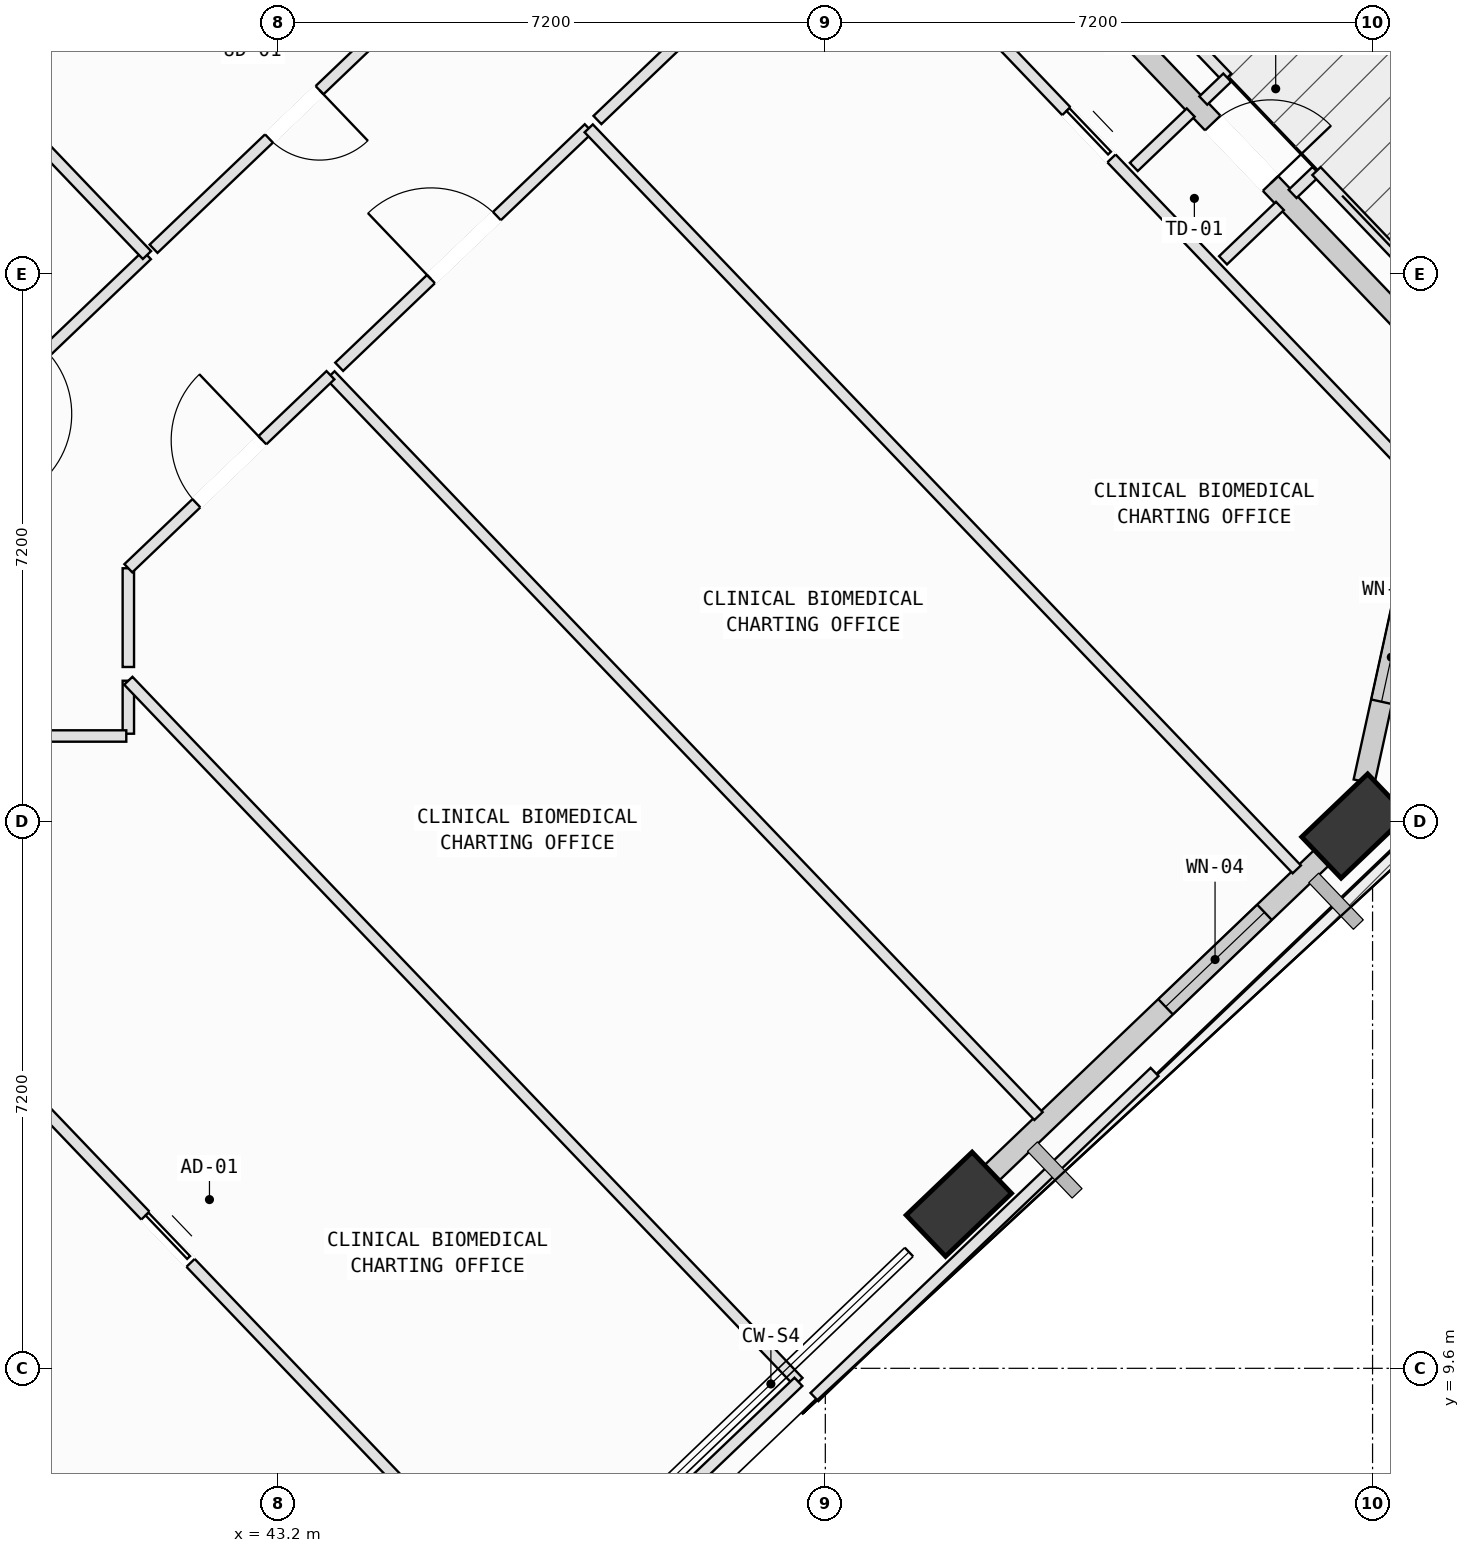
"""IFC4 building model, lengths in metres.
Left out: names, types, materials, properties, quantities, classifications, styles, units other than length and angle.
Written with IfcOpenShell. Run it as: python <this file> out.ifc"""

import sys

from ifc_helpers import new_model, si_unit, direction, frame, frame_2d, origin, origin_2d, place, context, subcontext, project, spatial, rectangle, extrude, element, fill, save


model = new_model("IFC4")
c1 = context("Model", 3, precision=1e-05, world=origin(), true_north=direction((0.0, 1.0)))
c2 = subcontext(c1, "Body", "Model", "MODEL_VIEW")
j1 = project(units=[si_unit("LENGTHUNIT", "METRE"), si_unit("PLANEANGLEUNIT", "RADIAN")], contexts=[c1])
p1 = place(None, origin())
s1 = spatial("IfcSite", under=j1, at=p1, CompositionType="ELEMENT")
p2 = place(p1, origin())
s2 = spatial("IfcBuilding", under=s1, at=p2, CompositionType="ELEMENT")
p3 = place(p2, frame((0.0, 0.0, 211.2)))
s3 = spatial("IfcBuildingStorey", under=s2, at=p3, CompositionType="ELEMENT", Elevation=211.2)
p4 = place(p3, frame((52.157, 11.759, 0.067), z_axis=(0.05323008736, 0.077032158944, 0.995606651388), x_axis=(-0.98581194201, -0.154886974175, 0.064690341027)))
e1 = element("IfcColumn", 1, at=p4, inside=s3, PredefinedType="COLUMN", context=c2, shape_type="SweptSolid", body=[
    extrude(rectangle(XDim=1.2, YDim=0.75, at=origin_2d()), origin(), (0.0, 0.0, 1.0), 3.949),
])
p5 = place(p3, frame((57.361, 16.735, 0.073), z_axis=(0.032482055305, 0.098250483475, 0.994631468726), x_axis=(-0.902127024393, -0.425506275001, 0.071492949273)))
e2 = element("IfcColumn", 2, at=p5, inside=s3, PredefinedType="COLUMN", context=c2, shape_type="SweptSolid", body=[
    extrude(rectangle(XDim=1.2, YDim=0.75, at=origin_2d()), origin(), (0.0, 0.0, 1.0), 3.946),
])
p6 = place(p3, frame((57.213, 16.589, 0.0), z_axis=(0.0, 0.0, 1.0), x_axis=(-0.722958179975, -0.69089179327, 0.0)))
e3 = element("IfcWall", 3, at=p6, inside=s3, PredefinedType="SOLIDWALL", context=c2, shape_type="SweptSolid", body=[
    extrude(rectangle(XDim=6.418, YDim=0.28, at=frame_2d((3.209, 0.0))), origin(), (0.0, 0.0, 1.0), 3.265),
])
p7 = place(p6, frame((1.431, 0.0, 0.75)))
e4 = element("IfcOpeningElement", 4, at=p7, cuts=e3, PredefinedType="OPENING", context=c2, shape_type="SweptSolid", body=[
    extrude(rectangle(XDim=1.8, YDim=2.05, at=frame_2d((0.9, 1.025))), frame((0.0, 0.15, 0.0), z_axis=(0.0, -1.0, 0.0), x_axis=(1.0, 0.0, 0.0)), (0.0, 0.0, 1.0), 0.3),
])
p8 = place(p3, frame((58.62, 22.49, 0.0), z_axis=(0.0, 0.0, 1.0), x_axis=(-0.213848166645, -0.976866910906, 0.0)))
e5 = element("IfcWall", 5, at=p8, inside=s3, PredefinedType="SOLIDWALL", context=c2, shape_type="SweptSolid", body=[
    extrude(rectangle(XDim=5.294, YDim=0.28, at=frame_2d((2.647, 0.0))), origin(), (0.0, 0.0, 1.0), 3.265),
])
p9 = place(p8, frame((3.017, 0.0, 0.75)))
e6 = element("IfcOpeningElement", 6, at=p9, cuts=e5, PredefinedType="OPENING", context=c2, shape_type="SweptSolid", body=[
    extrude(rectangle(XDim=1.2, YDim=1.75, at=frame_2d((0.6, 0.875))), frame((0.0, 0.15, 0.0), z_axis=(0.0, -1.0, 0.0), x_axis=(1.0, 0.0, 0.0)), (0.0, 0.0, 1.0), 0.3),
])
p10 = place(p3, frame((53.443, 28.135, 0.0), z_axis=(0.0, 0.0, 1.0), x_axis=(0.690865418221, -0.722983384253, 0.0)))
e7 = element("IfcWall", 7, at=p10, inside=s3, PredefinedType="SOLIDWALL", context=c2, shape_type="SweptSolid", body=[
    extrude(rectangle(XDim=7.046, YDim=0.28, at=frame_2d((3.523, 0.0))), origin(), (0.0, 0.0, 1.0), 3.265),
])
p11 = place(p10, frame((2.973, 0.0, 0.0)))
e8 = element("IfcOpeningElement", 8, at=p11, cuts=e7, PredefinedType="OPENING", context=c2, shape_type="SweptSolid", body=[
    extrude(rectangle(XDim=1.1, YDim=2.15, at=frame_2d((0.55, 1.075))), frame((0.0, 0.15, 0.0), z_axis=(0.0, -1.0, 0.0), x_axis=(1.0, 0.0, 0.0)), (0.0, 0.0, 1.0), 0.3),
])
p12 = place(p3, frame((36.15, 10.357, 0.0), z_axis=(0.0, 0.0, 1.0), x_axis=(0.690871478305, -0.722977593335, 0.0)))
e9 = element("IfcWall", 9, at=p12, inside=s3, PredefinedType="PARTITIONING", context=c2, shape_type="SweptSolid", body=[
    extrude(rectangle(XDim=9.931, YDim=0.15, at=frame_2d((4.966, 0.0))), origin(), (0.0, 0.0, 1.0), 3.78),
])
p13 = place(p12, frame((4.535, 0.0, 0.0)))
e10 = element("IfcOpeningElement", 10, at=p13, cuts=e9, PredefinedType="OPENING", context=c2, shape_type="SweptSolid", body=[
    extrude(rectangle(XDim=0.86, YDim=2.06, at=frame_2d((0.43, 1.03))), frame((0.0, 0.085, 0.0), z_axis=(0.0, -1.0, 0.0), x_axis=(1.0, 0.0, 0.0)), (0.0, 0.0, 1.0), 0.17),
])
p14 = place(p3, frame((37.093, 16.173, 0.0), z_axis=(0.0, 0.0, 1.0), x_axis=(0.690902774349, -0.722947685795, 0.0)))
e11 = element("IfcWall", 11, at=p14, inside=s3, PredefinedType="PARTITIONING", context=c2, shape_type="SweptSolid", body=[
    extrude(rectangle(XDim=13.485, YDim=0.15, at=frame_2d((6.743, 0.0))), origin(), (0.0, 0.0, 1.0), 3.78),
])
p15 = place(p14, frame((6.312, 0.0, 0.0)))
e12 = element("IfcOpeningElement", 12, at=p15, cuts=e11, PredefinedType="OPENING", context=c2, shape_type="SweptSolid", body=[
    extrude(rectangle(XDim=0.86, YDim=2.06, at=frame_2d((0.43, 1.03))), frame((0.0, 0.085, 0.0), z_axis=(0.0, -1.0, 0.0), x_axis=(1.0, 0.0, 0.0)), (0.0, 0.0, 1.0), 0.17),
])
p16 = place(p3, frame((41.23, 17.95, 0.0), z_axis=(0.0, 0.0, 1.0), x_axis=(0.0, 1.0, 0.0)))
e13 = element("IfcWall", 13, at=p16, inside=s3, PredefinedType="PARTITIONING", context=c2, shape_type="SweptSolid", body=[
    extrude(rectangle(XDim=0.697, YDim=0.15, at=frame_2d((0.349, 0.0))), origin(), (0.0, 0.0, 1.0), 3.78),
])
p17 = place(p3, frame((41.23, 18.647, 0.0), z_axis=(0.0, 0.0, 1.0), x_axis=(0.690901109008, -0.722949277316, 0.0)))
e14 = element("IfcWall", 14, at=p17, inside=s3, PredefinedType="PARTITIONING", context=c2, shape_type="SweptSolid", body=[
    extrude(rectangle(XDim=12.76, YDim=0.15, at=frame_2d((6.38, 0.0))), origin(), (0.0, 0.0, 1.0), 3.78),
])
p18 = place(p3, frame((50.046, 9.422, 0.0), z_axis=(0.0, 0.0, 1.0), x_axis=(-0.723045801537, -0.690800093283, 0.0)))
e15 = element("IfcWall", 15, at=p18, inside=s3, PredefinedType="PARTITIONING", context=c2, shape_type="SweptSolid", body=[
    extrude(rectangle(XDim=4.278, YDim=0.15, at=frame_2d((2.139, 0.0))), origin(), (0.0, 0.0, 1.0), 3.265),
])
p19 = place(p3, frame((38.921, 17.92, 0.0), z_axis=(0.0, 0.0, 1.0), x_axis=(1.0, 0.0, 0.0)))
e16 = element("IfcWall", 16, at=p19, inside=s3, PredefinedType="PARTITIONING", context=c2, shape_type="SweptSolid", body=[
    extrude(rectangle(XDim=2.282, YDim=0.15, at=frame_2d((1.141, 0.0))), origin(), (0.0, 0.0, 1.0), 3.78),
])
p20 = place(p3, frame((43.889, 22.667, 0.0), z_axis=(0.0, 0.0, 1.0), x_axis=(0.690910559681, -0.722940245471, 0.0)))
e17 = element("IfcWall", 17, at=p20, inside=s3, PredefinedType="PARTITIONING", context=c2, shape_type="SweptSolid", body=[
    extrude(rectangle(XDim=13.484, YDim=0.15, at=frame_2d((6.742, 0.0))), origin(), (0.0, 0.0, 1.0), 3.415),
])
p21 = place(p3, frame((41.23, 18.828, 0.0), z_axis=(0.0, 0.0, 1.0), x_axis=(0.0, 1.0, 0.0)))
e18 = element("IfcWall", 18, at=p21, inside=s3, PredefinedType="PARTITIONING", context=c2, shape_type="SweptSolid", body=[
    extrude(rectangle(XDim=1.299, YDim=0.15, at=frame_2d((0.649, 0.0))), origin(), (0.0, 0.0, 1.0), 3.78),
])
p22 = place(p3, frame((41.23, 20.127, 0.0), z_axis=(0.0, 0.0, 1.0), x_axis=(0.723088697015, 0.690755192705, 0.0)))
e19 = element("IfcWall", 19, at=p22, inside=s3, PredefinedType="PARTITIONING", context=c2, shape_type="SweptSolid", body=[
    extrude(rectangle(XDim=3.677, YDim=0.15, at=frame_2d((1.839, 0.0))), origin(), (0.0, 0.0, 1.0), 2.765),
])
p23 = place(p22, frame((1.239, 0.0, 0.0)))
e20 = element("IfcOpeningElement", 20, at=p23, cuts=e19, PredefinedType="OPENING", context=c2, shape_type="SweptSolid", body=[
    extrude(rectangle(XDim=1.2, YDim=2.15, at=frame_2d((0.6, 1.075))), frame((0.0, 0.085, 0.0), z_axis=(0.0, -1.0, 0.0), x_axis=(1.0, 0.0, 0.0)), (0.0, 0.0, 1.0), 0.17),
])
p24 = place(p3, frame((44.004, 22.778, 0.0), z_axis=(0.0, 0.0, 1.0), x_axis=(0.723025899483, 0.69082092374, 0.0)))
e21 = element("IfcWall", 21, at=p24, inside=s3, PredefinedType="PARTITIONING", context=c2, shape_type="SweptSolid", body=[
    extrude(rectangle(XDim=4.541, YDim=0.15, at=frame_2d((2.271, 0.0))), origin(), (0.0, 0.0, 1.0), 2.765),
])
p25 = place(p24, frame((1.67, 0.0, 0.0)))
e22 = element("IfcOpeningElement", 22, at=p25, cuts=e21, PredefinedType="OPENING", context=c2, shape_type="SweptSolid", body=[
    extrude(rectangle(XDim=1.2, YDim=2.15, at=frame_2d((0.6, 1.075))), frame((0.0, 0.085, 0.0), z_axis=(0.0, -1.0, 0.0), x_axis=(1.0, 0.0, 0.0)), (0.0, 0.0, 1.0), 0.17),
])
p26 = place(p3, frame((47.287, 25.915, 0.0), z_axis=(0.0, 0.0, 1.0), x_axis=(0.690828749695, -0.72301842203, 0.0)))
e23 = element("IfcWall", 23, at=p26, inside=s3, PredefinedType="PARTITIONING", context=c2, shape_type="SweptSolid", body=[
    extrude(rectangle(XDim=13.485, YDim=0.15, at=frame_2d((6.743, 0.0))), origin(), (0.0, 0.0, 1.0), 3.78),
])
p27 = place(p3, frame((59.397, 18.358, 0.0), z_axis=(0.0, 0.0, 1.0), x_axis=(-0.723173492575, -0.690666417047, 0.0)))
e24 = element("IfcWall", 24, at=p27, inside=s3, PredefinedType="PARTITIONING", context=c2, shape_type="SweptSolid", body=[
    extrude(rectangle(XDim=2.801, YDim=0.15, at=frame_2d((1.401, 0.0))), origin(), (0.0, 0.0, 1.0), 3.265),
])
p28 = place(p3, frame((47.402, 26.025, 0.0), z_axis=(0.0, 0.0, 1.0), x_axis=(0.722973384646, 0.690875882553, 0.0)))
e25 = element("IfcWall", 25, at=p28, inside=s3, PredefinedType="PARTITIONING", context=c2, shape_type="SweptSolid", body=[
    extrude(rectangle(XDim=4.541, YDim=0.15, at=frame_2d((2.271, 0.0))), origin(), (0.0, 0.0, 1.0), 3.78),
])
p29 = place(p28, frame((1.67, 0.0, 0.0)))
e26 = element("IfcOpeningElement", 26, at=p29, cuts=e25, PredefinedType="OPENING", context=c2, shape_type="SweptSolid", body=[
    extrude(rectangle(XDim=1.2, YDim=2.15, at=frame_2d((0.6, 1.075))), frame((0.0, 0.085, 0.0), z_axis=(0.0, -1.0, 0.0), x_axis=(1.0, 0.0, 0.0)), (0.0, 0.0, 1.0), 0.17),
])
p30 = place(p3, frame((50.685, 29.162, 0.0), z_axis=(0.0, 0.0, 1.0), x_axis=(0.690801446866, -0.723044508317, 0.0)))
e27 = element("IfcWall", 27, at=p30, inside=s3, PredefinedType="PARTITIONING", context=c2, shape_type="SweptSolid", body=[
    extrude(rectangle(XDim=10.926, YDim=0.15, at=frame_2d((5.463, 0.0))), origin(), (0.0, 0.0, 1.0), 3.78),
])
p31 = place(p30, frame((4.177, 0.0, 0.0)))
e28 = element("IfcOpeningElement", 28, at=p31, cuts=e27, PredefinedType="OPENING", context=c2, shape_type="SweptSolid", body=[
    extrude(rectangle(XDim=0.86, YDim=2.06, at=frame_2d((0.43, 1.03))), frame((0.0, 0.085, 0.0), z_axis=(0.0, -1.0, 0.0), x_axis=(1.0, 0.0, 0.0)), (0.0, 0.0, 1.0), 0.17),
])
p32 = place(p3, frame((41.475, 24.248, 0.0), z_axis=(0.0, 0.0, 1.0), x_axis=(-0.723006310532, -0.690841425315, 0.0)))
e29 = element("IfcWall", 29, at=p32, inside=s3, PredefinedType="PARTITIONING", context=c2, shape_type="SweptSolid", body=[
    extrude(rectangle(XDim=4.858, YDim=0.15, at=frame_2d((2.429, 0.0))), origin(), (0.0, 0.0, 1.0), 2.765),
])
p33 = place(p32, frame((1.829, 0.0, 0.0)))
e30 = element("IfcOpeningElement", 30, at=p33, cuts=e29, PredefinedType="OPENING", context=c2, shape_type="SweptSolid", body=[
    extrude(rectangle(XDim=1.2, YDim=2.15, at=frame_2d((0.6, 1.075))), frame((0.0, 0.085, 0.0), z_axis=(0.0, -1.0, 0.0), x_axis=(1.0, 0.0, 0.0)), (0.0, 0.0, 1.0), 0.17),
])
p34 = place(p3, frame((38.453, 27.411, 0.0), z_axis=(0.0, 0.0, 1.0), x_axis=(0.690851288879, -0.722996885647, 0.0)))
e31 = element("IfcWall", 31, at=p34, inside=s3, PredefinedType="PARTITIONING", context=c2, shape_type="SweptSolid", body=[
    extrude(rectangle(XDim=4.375, YDim=0.15, at=frame_2d((2.187, 0.0))), origin(), (0.0, 0.0, 1.0), 3.415),
])
p35 = place(p3, frame((45.264, 27.868, 0.0), z_axis=(0.0, 0.0, 1.0), x_axis=(-0.723040441691, -0.690805703276, 0.0)))
e32 = element("IfcWall", 32, at=p35, inside=s3, PredefinedType="PARTITIONING", context=c2, shape_type="SweptSolid", body=[
    extrude(rectangle(XDim=5.12, YDim=0.15, at=frame_2d((2.56, 0.0))), origin(), (0.0, 0.0, 1.0), 3.78),
])
p36 = place(p35, frame((2.1, 0.0, 0.0)))
e33 = element("IfcOpeningElement", 33, at=p36, cuts=e32, PredefinedType="OPENING", context=c2, shape_type="SweptSolid", body=[
    extrude(rectangle(XDim=0.92, YDim=2.1, at=frame_2d((0.46, 1.05))), frame((0.0, 0.085, 0.0), z_axis=(0.0, -1.0, 0.0), x_axis=(1.0, 0.0, 0.0)), (0.0, 0.0, 1.0), 0.17),
])
p37 = place(p3, frame((54.732, 13.499, 0.0), z_axis=(0.0, 0.0, 1.0), x_axis=(-0.722899628279, -0.690953057331, 0.0)))
e34 = element("IfcWall", 34, at=p37, inside=s3, PredefinedType="PARTITIONING", context=c2, shape_type="SweptSolid", body=[
    extrude(rectangle(XDim=6.19, YDim=0.15, at=frame_2d((3.095, 0.0))), origin(), (0.0, 0.0, 1.0), 3.78),
])
p38 = place(p3, frame((51.963, 30.48, 0.0), z_axis=(0.0, 0.0, 1.0), x_axis=(0.690895641029, -0.722954502862, 0.0)))
e35 = element("IfcWall", 35, at=p38, inside=s3, PredefinedType="PARTITIONING", context=c2, shape_type="SweptSolid", body=[
    extrude(rectangle(XDim=5.392, YDim=0.15, at=frame_2d((2.696, 0.0))), origin(), (0.0, 0.0, 1.0), 3.265),
])
p39 = place(p3, frame((55.688, 26.582, 0.0), z_axis=(0.0, 0.0, 1.0), x_axis=(-0.7228973834, -0.690955405994, 0.0)))
e36 = element("IfcWall", 36, at=p39, inside=s3, PredefinedType="PARTITIONING", context=c2, shape_type="SweptSolid", body=[
    extrude(rectangle(XDim=0.436, YDim=0.15, at=frame_2d((0.218, 0.0))), origin(), (0.0, 0.0, 1.0), 3.78),
])
for number, where, z_axis, x_axis in (
    (37, (55.207, 26.123, 0.0), (0.0, 0.0, 1.0), (-0.723, -0.691, 0.0)),
    (38, (55.633, 24.179, 0.0), (0.0, 0.0, 1.0), (0.723, 0.691, 0.0)),
):
    element("IfcWall", number, at=place(p3, frame(where, z_axis=z_axis, x_axis=x_axis)), inside=s3, PredefinedType="PARTITIONING", context=c2, shape_type="SweptSolid", body=[
        extrude(rectangle(XDim=1.035, YDim=0.15, at=frame_2d((0.518, 0.0))), origin(), (0.0, 0.0, 1.0), 3.78),
    ])
p40 = place(p3, frame((56.548, 25.053, 0.0), z_axis=(0.0, 0.0, 1.0), x_axis=(0.722947010739, 0.690903480714, 0.0)))
e39 = element("IfcWall", 39, at=p40, inside=s3, PredefinedType="PARTITIONING", context=c2, shape_type="SweptSolid", body=[
    extrude(rectangle(XDim=0.434, YDim=0.15, at=frame_2d((0.217, 0.0))), origin(), (0.0, 0.0, 1.0), 3.78),
])
p41 = place(p3, frame((56.862, 25.353, 0.0), z_axis=(0.0, 0.0, 1.0), x_axis=(0.690932627738, -0.722919154489, 0.0)))
e40 = element("IfcWall", 40, at=p41, inside=s3, PredefinedType="PARTITIONING", context=c2, shape_type="SweptSolid", body=[
    extrude(rectangle(XDim=4.129, YDim=0.15, at=frame_2d((2.064, 0.0))), origin(), (0.0, 0.0, 1.0), 3.265),
])
p42 = place(p11, origin())
e41 = element("IfcDoor", 41, at=p42, inside=s3, OperationType="SINGLE_SWING_RIGHT", PredefinedType="DOOR", context=c2, shape_type="SweptSolid", body=[
    extrude(rectangle(XDim=1.1, YDim=2.15, at=frame_2d((0.55, 1.075))), frame((0.0, 0.025, 0.0), z_axis=(0.0, -1.0, 0.0), x_axis=(1.0, 0.0, 0.0)), (0.0, 0.0, 1.0), 0.05),
])
fill(e8, e41)
p43 = place(p7, origin())
e42 = element("IfcWindow", 42, at=p43, inside=s3, PartitioningType="SINGLE_PANEL", PredefinedType="WINDOW", context=c2, shape_type="SweptSolid", body=[
    extrude(rectangle(XDim=1.8, YDim=2.05, at=frame_2d((0.9, 1.025))), frame((0.0, 0.03, 0.0), z_axis=(0.0, -1.0, 0.0), x_axis=(1.0, 0.0, 0.0)), (0.0, 0.0, 1.0), 0.06),
])
fill(e4, e42)
p44 = place(p9, origin())
e43 = element("IfcWindow", 43, at=p44, inside=s3, PartitioningType="SINGLE_PANEL", PredefinedType="WINDOW", context=c2, shape_type="SweptSolid", body=[
    extrude(rectangle(XDim=1.2, YDim=1.75, at=frame_2d((0.6, 0.875))), frame((0.0, 0.03, 0.0), z_axis=(0.0, -1.0, 0.0), x_axis=(1.0, 0.0, 0.0)), (0.0, 0.0, 1.0), 0.06),
])
fill(e6, e43)
p45 = place(p23, origin())
e44 = element("IfcDoor", 44, at=p45, inside=s3, OperationType="SINGLE_SWING_RIGHT", PredefinedType="DOOR", context=c2, shape_type="SweptSolid", body=[
    extrude(rectangle(XDim=1.2, YDim=2.15, at=frame_2d((0.6, 1.075))), frame((0.0, 0.025, 0.0), z_axis=(0.0, -1.0, 0.0), x_axis=(1.0, 0.0, 0.0)), (0.0, 0.0, 1.0), 0.05),
])
fill(e20, e44)
p46 = place(p25, origin())
e45 = element("IfcDoor", 45, at=p46, inside=s3, OperationType="SINGLE_SWING_LEFT", PredefinedType="DOOR", context=c2, shape_type="SweptSolid", body=[
    extrude(rectangle(XDim=1.2, YDim=2.15, at=frame_2d((0.6, 1.075))), frame((0.0, 0.025, 0.0), z_axis=(0.0, -1.0, 0.0), x_axis=(1.0, 0.0, 0.0)), (0.0, 0.0, 1.0), 0.05),
])
fill(e22, e45)
p47 = place(p36, origin())
e46 = element("IfcDoor", 46, at=p47, inside=s3, OperationType="SINGLE_SWING_LEFT", PredefinedType="DOOR", context=c2, shape_type="SweptSolid", body=[
    extrude(rectangle(XDim=0.92, YDim=2.1, at=frame_2d((0.46, 1.05))), frame((0.0, 0.025, 0.0), z_axis=(0.0, -1.0, 0.0), x_axis=(1.0, 0.0, 0.0)), (0.0, 0.0, 1.0), 0.05),
])
fill(e33, e46)
p48 = place(p15, origin())
e47 = element("IfcDoor", 47, at=p48, inside=s3, OperationType="SLIDING_TO_LEFT", PredefinedType="DOOR", context=c2, shape_type="SweptSolid", body=[
    extrude(rectangle(XDim=0.86, YDim=2.06, at=frame_2d((0.43, 1.03))), frame((0.0, 0.025, 0.0), z_axis=(0.0, -1.0, 0.0), x_axis=(1.0, 0.0, 0.0)), (0.0, 0.0, 1.0), 0.05),
])
fill(e12, e47)
p49 = place(p31, origin())
e48 = element("IfcDoor", 48, at=p49, inside=s3, OperationType="SLIDING_TO_LEFT", PredefinedType="DOOR", context=c2, shape_type="SweptSolid", body=[
    extrude(rectangle(XDim=0.86, YDim=2.06, at=frame_2d((0.43, 1.03))), frame((0.0, 0.025, 0.0), z_axis=(0.0, -1.0, 0.0), x_axis=(1.0, 0.0, 0.0)), (0.0, 0.0, 1.0), 0.05),
])
fill(e28, e48)
save(model, sys.argv[1])
